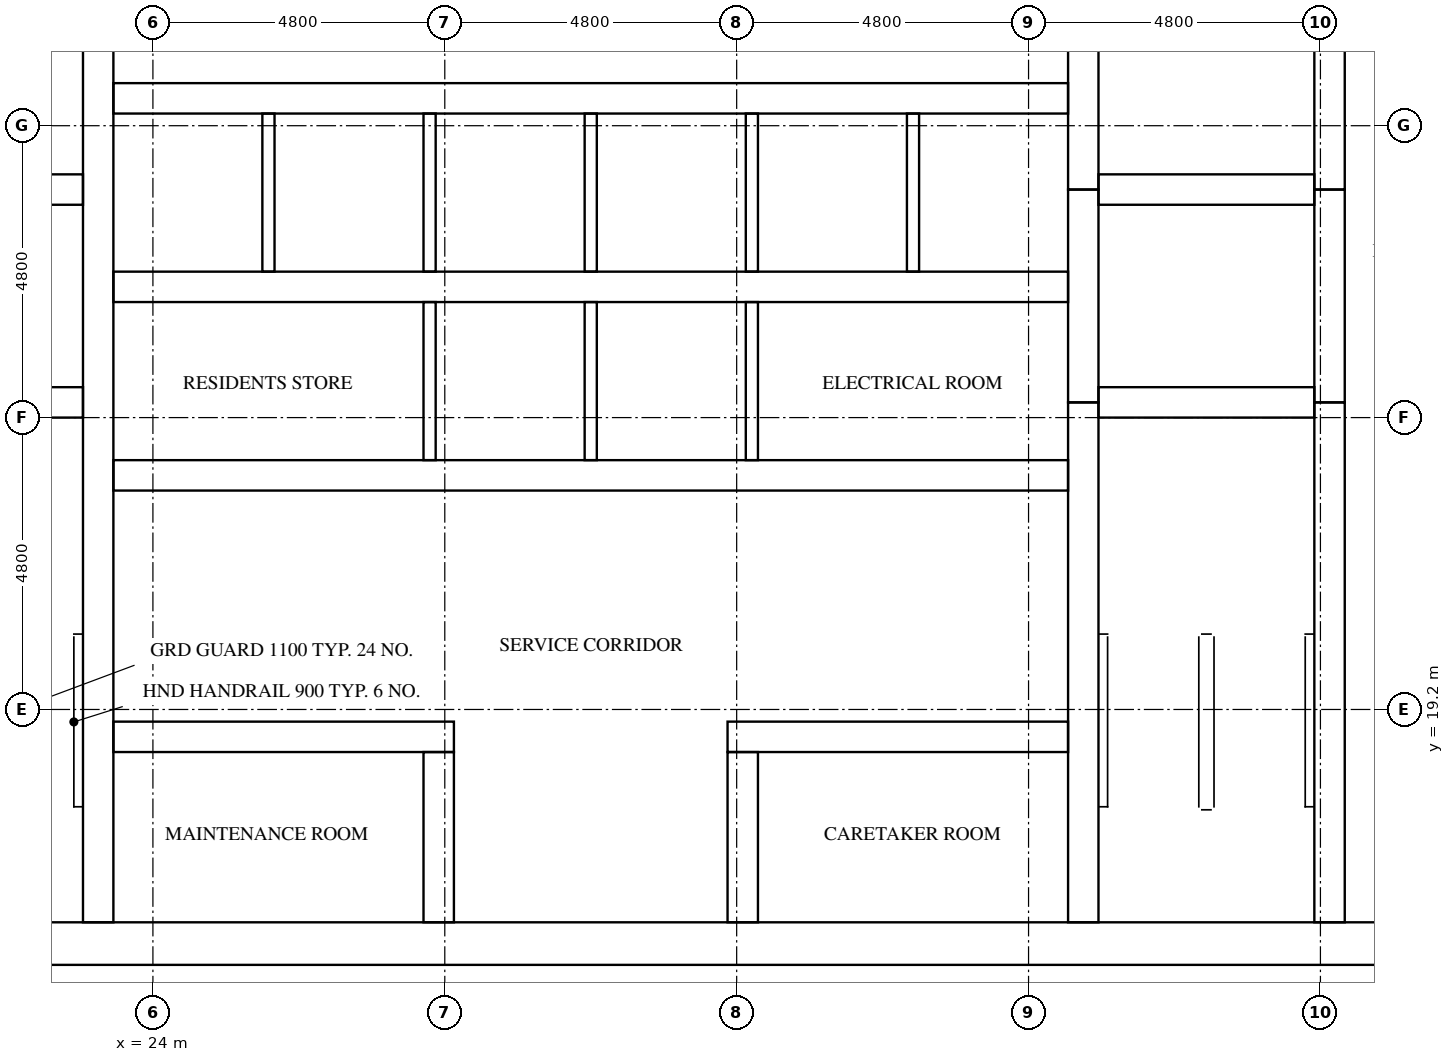
"""IFC4 building model, lengths in metres.
Left out: names, types, materials, properties, quantities, classifications, styles, units other than length and angle.
Written with IfcOpenShell. Run it as: python <this file> out.ifc"""

import sys

from ifc_helpers import new_model, si_unit, direction, frame, frame_2d, origin, place, context, subcontext, project, spatial, rectangle, extrude, element, fill, save


model = new_model("IFC4")
c1 = context("Model", 3, precision=1e-05, world=origin(), true_north=direction((0.0, 1.0)))
c2 = subcontext(c1, "Body", "Model", "MODEL_VIEW")
j1 = project(units=[si_unit("LENGTHUNIT", "METRE"), si_unit("PLANEANGLEUNIT", "RADIAN")], contexts=[c1])
p1 = place(None, origin())
s1 = spatial("IfcSite", under=j1, at=p1, CompositionType="ELEMENT")
p2 = place(p1, origin())
s2 = spatial("IfcBuilding", under=s1, at=p2, CompositionType="ELEMENT")
p3 = place(p2, frame((0.0, 0.0, 196.4)))
s3 = spatial("IfcBuildingStorey", under=s2, at=p3, CompositionType="ELEMENT", Elevation=196.4)
p4 = place(p3, frame((15.0, 15.35, 0.0), z_axis=(0.0, 0.0, 1.0), x_axis=(1.0, 0.0, 0.0)))
e1 = element("IfcWall", 1, at=p4, inside=s3, PredefinedType="SHEAR", context=c2, shape_type="SweptSolid", body=[
    extrude(rectangle(XDim=32.4, YDim=0.7, at=frame_2d((16.2, 0.0))), origin(), (0.0, 0.0, 1.0), 3.2),
])
p5 = place(p4, frame((15.3, 0.0, 0.0)))
e2 = element("IfcOpeningElement", 2, at=p5, cuts=e1, PredefinedType="OPENING", context=c2, shape_type="SweptSolid", body=[
    extrude(rectangle(XDim=1.8, YDim=2.1, at=frame_2d((0.9, 1.05))), frame((0.0, 0.36, 0.0), z_axis=(0.0, -1.0, 0.0), x_axis=(1.0, 0.0, 0.0)), (0.0, 0.0, 1.0), 0.72),
])
p6 = place(p3, frame((23.1, 15.7, 0.0), z_axis=(0.0, 0.0, 1.0), x_axis=(0.0, 1.0, 0.0)))
e3 = element("IfcWall", 3, at=p6, inside=s3, PredefinedType="SHEAR", context=c2, shape_type="SweptSolid", body=[
    extrude(rectangle(XDim=21.4, YDim=0.5, at=frame_2d((10.7, 0.0))), origin(), (0.0, 0.0, 1.0), 3.2),
])
p7 = place(p3, frame((39.3, 15.7, 0.0), z_axis=(0.0, 0.0, 1.0), x_axis=(0.0, 1.0, 0.0)))
e4 = element("IfcWall", 4, at=p7, inside=s3, PredefinedType="SHEAR", context=c2, shape_type="SweptSolid", body=[
    extrude(rectangle(XDim=8.55, YDim=0.5, at=frame_2d((4.275, 0.0))), origin(), (0.0, 0.0, 1.0), 3.2),
])
p8 = place(p3, frame((39.3, 24.25, 0.0), z_axis=(0.0, 0.0, 1.0), x_axis=(0.0, 1.0, 0.0)))
e5 = element("IfcWall", 5, at=p8, inside=s3, PredefinedType="SHEAR", context=c2, shape_type="SweptSolid", body=[
    extrude(rectangle(XDim=3.5, YDim=0.5, at=frame_2d((1.75, 0.0))), origin(), (0.0, 0.0, 1.0), 3.2),
])
p9 = place(p3, frame((39.3, 27.75, 0.0), z_axis=(0.0, 0.0, 1.0), x_axis=(0.0, 1.0, 0.0)))
e6 = element("IfcWall", 6, at=p9, inside=s3, PredefinedType="SHEAR", context=c2, shape_type="SweptSolid", body=[
    extrude(rectangle(XDim=9.35, YDim=0.5, at=frame_2d((4.675, 0.0))), origin(), (0.0, 0.0, 1.0), 3.2),
])
p10 = place(p3, frame((43.35, 15.7, 0.0), z_axis=(0.0, 0.0, 1.0), x_axis=(0.0, 1.0, 0.0)))
e7 = element("IfcWall", 7, at=p10, inside=s3, PredefinedType="SHEAR", context=c2, shape_type="SweptSolid", body=[
    extrude(rectangle(XDim=8.55, YDim=0.5, at=frame_2d((4.275, 0.0))), origin(), (0.0, 0.0, 1.0), 3.2),
])
p11 = place(p10, frame((0.5, 0.0, 0.0)))
e8 = element("IfcOpeningElement", 8, at=p11, cuts=e7, PredefinedType="OPENING", context=c2, shape_type="SweptSolid", body=[
    extrude(rectangle(XDim=1.2, YDim=2.1, at=frame_2d((0.6, 1.05))), frame((0.0, 0.26, 0.0), z_axis=(0.0, -1.0, 0.0), x_axis=(1.0, 0.0, 0.0)), (0.0, 0.0, 1.0), 0.52),
])
p12 = place(p3, frame((43.35, 24.25, 0.0), z_axis=(0.0, 0.0, 1.0), x_axis=(0.0, 1.0, 0.0)))
e9 = element("IfcWall", 9, at=p12, inside=s3, PredefinedType="SHEAR", context=c2, shape_type="SweptSolid", body=[
    extrude(rectangle(XDim=3.5, YDim=0.5, at=frame_2d((1.75, 0.0))), origin(), (0.0, 0.0, 1.0), 3.2),
])
p13 = place(p12, frame((1.2, 0.0, 0.0)))
e10 = element("IfcOpeningElement", 10, at=p13, cuts=e9, PredefinedType="OPENING", context=c2, shape_type="SweptSolid", body=[
    extrude(rectangle(XDim=1.1, YDim=2.1, at=frame_2d((0.55, 1.05))), frame((0.0, 0.26, 0.0), z_axis=(0.0, -1.0, 0.0), x_axis=(1.0, 0.0, 0.0)), (0.0, 0.0, 1.0), 0.52),
])
p14 = place(p3, frame((43.35, 27.75, 0.0), z_axis=(0.0, 0.0, 1.0), x_axis=(0.0, 1.0, 0.0)))
e11 = element("IfcWall", 11, at=p14, inside=s3, PredefinedType="SHEAR", context=c2, shape_type="SweptSolid", body=[
    extrude(rectangle(XDim=9.35, YDim=0.5, at=frame_2d((4.675, 0.0))), origin(), (0.0, 0.0, 1.0), 3.2),
])
p15 = place(p14, frame((7.65, 0.0, 0.0)))
e12 = element("IfcOpeningElement", 12, at=p15, cuts=e11, PredefinedType="OPENING", context=c2, shape_type="SweptSolid", body=[
    extrude(rectangle(XDim=1.2, YDim=2.1, at=frame_2d((0.6, 1.05))), frame((0.0, 0.26, 0.0), z_axis=(0.0, -1.0, 0.0), x_axis=(1.0, 0.0, 0.0)), (0.0, 0.0, 1.0), 0.52),
])
for number, where, z_axis, x_axis in (
    (13, (19.3, 24.25, 0.0), (0.0, 0.0, 1.0), (1.0, 0.0, 0.0)),
    (14, (19.3, 27.75, 0.0), (0.0, 0.0, 1.0), (1.0, 0.0, 0.0)),
    (15, (39.55, 24.25, 0.0), (0.0, 0.0, 1.0), (1.0, 0.0, 0.0)),
    (16, (39.55, 27.75, 0.0), (0.0, 0.0, 1.0), (1.0, 0.0, 0.0)),
):
    element("IfcWall", number, at=place(p3, frame(where, z_axis=z_axis, x_axis=x_axis)), inside=s3, PredefinedType="SHEAR", context=c2, shape_type="SweptSolid", body=[
        extrude(rectangle(XDim=3.55, YDim=0.5, at=frame_2d((1.775, 0.0))), origin(), (0.0, 0.0, 1.0), 3.2),
    ])
p16 = place(p3, frame((23.35, 18.75, 0.0), z_axis=(0.0, 0.0, 1.0), x_axis=(1.0, 0.0, 0.0)))
e17 = element("IfcWall", 17, at=p16, inside=s3, PredefinedType="SHEAR", context=c2, shape_type="SweptSolid", body=[
    extrude(rectangle(XDim=5.6, YDim=0.5, at=frame_2d((2.8, 0.0))), origin(), (0.0, 0.0, 1.0), 3.2),
])
p17 = place(p16, frame((2.05, 0.0, 0.0)))
e18 = element("IfcOpeningElement", 18, at=p17, cuts=e17, PredefinedType="OPENING", context=c2, shape_type="SweptSolid", body=[
    extrude(rectangle(XDim=1.0, YDim=2.1, at=frame_2d((0.5, 1.05))), frame((0.0, 0.26, 0.0), z_axis=(0.0, -1.0, 0.0), x_axis=(1.0, 0.0, 0.0)), (0.0, 0.0, 1.0), 0.52),
])
p18 = place(p3, frame((33.45, 18.75, 0.0), z_axis=(0.0, 0.0, 1.0), x_axis=(1.0, 0.0, 0.0)))
e19 = element("IfcWall", 19, at=p18, inside=s3, PredefinedType="SHEAR", context=c2, shape_type="SweptSolid", body=[
    extrude(rectangle(XDim=5.6, YDim=0.5, at=frame_2d((2.8, 0.0))), origin(), (0.0, 0.0, 1.0), 3.2),
])
p19 = place(p18, frame((2.55, 0.0, 0.0)))
e20 = element("IfcOpeningElement", 20, at=p19, cuts=e19, PredefinedType="OPENING", context=c2, shape_type="SweptSolid", body=[
    extrude(rectangle(XDim=1.0, YDim=2.1, at=frame_2d((0.5, 1.05))), frame((0.0, 0.26, 0.0), z_axis=(0.0, -1.0, 0.0), x_axis=(1.0, 0.0, 0.0)), (0.0, 0.0, 1.0), 0.52),
])
p20 = place(p3, frame((23.35, 23.05, 0.0), z_axis=(0.0, 0.0, 1.0), x_axis=(1.0, 0.0, 0.0)))
e21 = element("IfcWall", 21, at=p20, inside=s3, PredefinedType="SHEAR", context=c2, shape_type="SweptSolid", body=[
    extrude(rectangle(XDim=15.7, YDim=0.5, at=frame_2d((7.85, 0.0))), origin(), (0.0, 0.0, 1.0), 3.2),
])
p21 = place(p20, frame((2.05, 0.0, 0.0)))
e22 = element("IfcOpeningElement", 22, at=p21, cuts=e21, PredefinedType="OPENING", context=c2, shape_type="SweptSolid", body=[
    extrude(rectangle(XDim=1.0, YDim=2.1, at=frame_2d((0.5, 1.05))), frame((0.0, 0.26, 0.0), z_axis=(0.0, -1.0, 0.0), x_axis=(1.0, 0.0, 0.0)), (0.0, 0.0, 1.0), 0.52),
])
p22 = place(p20, frame((12.65, 0.0, 0.0)))
e23 = element("IfcOpeningElement", 23, at=p22, cuts=e21, PredefinedType="OPENING", context=c2, shape_type="SweptSolid", body=[
    extrude(rectangle(XDim=1.0, YDim=2.1, at=frame_2d((0.5, 1.05))), frame((0.0, 0.26, 0.0), z_axis=(0.0, -1.0, 0.0), x_axis=(1.0, 0.0, 0.0)), (0.0, 0.0, 1.0), 0.52),
])
p23 = place(p3, frame((23.35, 26.15, 0.0), z_axis=(0.0, 0.0, 1.0), x_axis=(1.0, 0.0, 0.0)))
e24 = element("IfcWall", 24, at=p23, inside=s3, PredefinedType="SHEAR", context=c2, shape_type="SweptSolid", body=[
    extrude(rectangle(XDim=15.7, YDim=0.5, at=frame_2d((7.85, 0.0))), origin(), (0.0, 0.0, 1.0), 3.2),
])
p24 = place(p3, frame((23.35, 29.25, 0.0), z_axis=(0.0, 0.0, 1.0), x_axis=(1.0, 0.0, 0.0)))
e25 = element("IfcWall", 25, at=p24, inside=s3, PredefinedType="SHEAR", context=c2, shape_type="SweptSolid", body=[
    extrude(rectangle(XDim=15.7, YDim=0.5, at=frame_2d((7.85, 0.0))), origin(), (0.0, 0.0, 1.0), 3.2),
])
p25 = place(p24, frame((0.675, 0.0, 0.0)))
e26 = element("IfcOpeningElement", 26, at=p25, cuts=e25, PredefinedType="OPENING", context=c2, shape_type="SweptSolid", body=[
    extrude(rectangle(XDim=1.1, YDim=2.1, at=frame_2d((0.55, 1.05))), frame((0.0, 0.26, 0.0), z_axis=(0.0, -1.0, 0.0), x_axis=(1.0, 0.0, 0.0)), (0.0, 0.0, 1.0), 0.52),
])
p26 = place(p24, frame((3.325, 0.0, 0.0)))
e27 = element("IfcOpeningElement", 27, at=p26, cuts=e25, PredefinedType="OPENING", context=c2, shape_type="SweptSolid", body=[
    extrude(rectangle(XDim=1.1, YDim=2.1, at=frame_2d((0.55, 1.05))), frame((0.0, 0.26, 0.0), z_axis=(0.0, -1.0, 0.0), x_axis=(1.0, 0.0, 0.0)), (0.0, 0.0, 1.0), 0.52),
])
p27 = place(p24, frame((5.975, 0.0, 0.0)))
e28 = element("IfcOpeningElement", 28, at=p27, cuts=e25, PredefinedType="OPENING", context=c2, shape_type="SweptSolid", body=[
    extrude(rectangle(XDim=1.1, YDim=2.1, at=frame_2d((0.55, 1.05))), frame((0.0, 0.26, 0.0), z_axis=(0.0, -1.0, 0.0), x_axis=(1.0, 0.0, 0.0)), (0.0, 0.0, 1.0), 0.52),
])
p28 = place(p24, frame((8.625, 0.0, 0.0)))
e29 = element("IfcOpeningElement", 29, at=p28, cuts=e25, PredefinedType="OPENING", context=c2, shape_type="SweptSolid", body=[
    extrude(rectangle(XDim=1.1, YDim=2.1, at=frame_2d((0.55, 1.05))), frame((0.0, 0.26, 0.0), z_axis=(0.0, -1.0, 0.0), x_axis=(1.0, 0.0, 0.0)), (0.0, 0.0, 1.0), 0.52),
])
p29 = place(p24, frame((11.275, 0.0, 0.0)))
e30 = element("IfcOpeningElement", 30, at=p29, cuts=e25, PredefinedType="OPENING", context=c2, shape_type="SweptSolid", body=[
    extrude(rectangle(XDim=1.1, YDim=2.1, at=frame_2d((0.55, 1.05))), frame((0.0, 0.26, 0.0), z_axis=(0.0, -1.0, 0.0), x_axis=(1.0, 0.0, 0.0)), (0.0, 0.0, 1.0), 0.52),
])
p30 = place(p24, frame((13.925, 0.0, 0.0)))
e31 = element("IfcOpeningElement", 31, at=p30, cuts=e25, PredefinedType="OPENING", context=c2, shape_type="SweptSolid", body=[
    extrude(rectangle(XDim=1.1, YDim=2.1, at=frame_2d((0.55, 1.05))), frame((0.0, 0.26, 0.0), z_axis=(0.0, -1.0, 0.0), x_axis=(1.0, 0.0, 0.0)), (0.0, 0.0, 1.0), 0.52),
])
for number, where, z_axis, x_axis in (
    (32, (28.7, 15.7, 0.0), (0.0, 0.0, 1.0), (0.0, 1.0, 0.0)),
    (33, (33.7, 15.7, 0.0), (0.0, 0.0, 1.0), (0.0, 1.0, 0.0)),
):
    element("IfcWall", number, at=place(p3, frame(where, z_axis=z_axis, x_axis=x_axis)), inside=s3, PredefinedType="SHEAR", context=c2, shape_type="SweptSolid", body=[
        extrude(rectangle(XDim=2.8, YDim=0.5, at=frame_2d((1.4, 0.0))), origin(), (0.0, 0.0, 1.0), 3.2),
    ])
p31 = place(p3, frame((25.9, 26.4, 0.0), z_axis=(0.0, 0.0, 1.0), x_axis=(0.0, 1.0, 0.0)))
e34 = element("IfcWall", 34, at=p31, inside=s3, PredefinedType="SOLIDWALL", context=c2, shape_type="SweptSolid", body=[
    extrude(rectangle(XDim=2.6, YDim=0.2, at=frame_2d((1.3, 0.0))), origin(), (0.0, 0.0, 1.0), 3.2),
])
p32 = place(p3, frame((28.55, 23.3, 0.0), z_axis=(0.0, 0.0, 1.0), x_axis=(0.0, 1.0, 0.0)))
e35 = element("IfcWall", 35, at=p32, inside=s3, PredefinedType="SOLIDWALL", context=c2, shape_type="SweptSolid", body=[
    extrude(rectangle(XDim=2.6, YDim=0.2, at=frame_2d((1.3, 0.0))), origin(), (0.0, 0.0, 1.0), 3.2),
])
p33 = place(p3, frame((28.55, 26.4, 0.0), z_axis=(0.0, 0.0, 1.0), x_axis=(0.0, 1.0, 0.0)))
e36 = element("IfcWall", 36, at=p33, inside=s3, PredefinedType="SOLIDWALL", context=c2, shape_type="SweptSolid", body=[
    extrude(rectangle(XDim=2.6, YDim=0.2, at=frame_2d((1.3, 0.0))), origin(), (0.0, 0.0, 1.0), 3.2),
])
p34 = place(p3, frame((31.2, 23.3, 0.0), z_axis=(0.0, 0.0, 1.0), x_axis=(0.0, 1.0, 0.0)))
e37 = element("IfcWall", 37, at=p34, inside=s3, PredefinedType="SOLIDWALL", context=c2, shape_type="SweptSolid", body=[
    extrude(rectangle(XDim=2.6, YDim=0.2, at=frame_2d((1.3, 0.0))), origin(), (0.0, 0.0, 1.0), 3.2),
])
p35 = place(p3, frame((31.2, 26.4, 0.0), z_axis=(0.0, 0.0, 1.0), x_axis=(0.0, 1.0, 0.0)))
e38 = element("IfcWall", 38, at=p35, inside=s3, PredefinedType="SOLIDWALL", context=c2, shape_type="SweptSolid", body=[
    extrude(rectangle(XDim=2.6, YDim=0.2, at=frame_2d((1.3, 0.0))), origin(), (0.0, 0.0, 1.0), 3.2),
])
p36 = place(p3, frame((33.85, 23.3, 0.0), z_axis=(0.0, 0.0, 1.0), x_axis=(0.0, 1.0, 0.0)))
e39 = element("IfcWall", 39, at=p36, inside=s3, PredefinedType="SOLIDWALL", context=c2, shape_type="SweptSolid", body=[
    extrude(rectangle(XDim=2.6, YDim=0.2, at=frame_2d((1.3, 0.0))), origin(), (0.0, 0.0, 1.0), 3.2),
])
for number, where, z_axis, x_axis in (
    (40, (33.85, 26.4, 0.0), (0.0, 0.0, 1.0), (0.0, 1.0, 0.0)),
    (41, (36.5, 26.4, 0.0), (0.0, 0.0, 1.0), (0.0, 1.0, 0.0)),
):
    element("IfcWall", number, at=place(p3, frame(where, z_axis=z_axis, x_axis=x_axis)), inside=s3, PredefinedType="SOLIDWALL", context=c2, shape_type="SweptSolid", body=[
        extrude(rectangle(XDim=2.6, YDim=0.2, at=frame_2d((1.3, 0.0))), origin(), (0.0, 0.0, 1.0), 3.2),
    ])
p37 = place(p25, origin())
e42 = element("IfcDoor", 42, at=p37, inside=s3, OperationType="DOUBLE_DOOR_SLIDING", PredefinedType="DOOR", context=c2, shape_type="SweptSolid", body=[
    extrude(rectangle(XDim=1.1, YDim=2.1, at=frame_2d((0.55, 1.05))), frame((0.0, 0.025, 0.0), z_axis=(0.0, -1.0, 0.0), x_axis=(1.0, 0.0, 0.0)), (0.0, 0.0, 1.0), 0.05),
])
fill(e26, e42)
p38 = place(p26, origin())
e43 = element("IfcDoor", 43, at=p38, inside=s3, OperationType="DOUBLE_DOOR_SLIDING", PredefinedType="DOOR", context=c2, shape_type="SweptSolid", body=[
    extrude(rectangle(XDim=1.1, YDim=2.1, at=frame_2d((0.55, 1.05))), frame((0.0, 0.025, 0.0), z_axis=(0.0, -1.0, 0.0), x_axis=(1.0, 0.0, 0.0)), (0.0, 0.0, 1.0), 0.05),
])
fill(e27, e43)
p39 = place(p27, origin())
e44 = element("IfcDoor", 44, at=p39, inside=s3, OperationType="DOUBLE_DOOR_SLIDING", PredefinedType="DOOR", context=c2, shape_type="SweptSolid", body=[
    extrude(rectangle(XDim=1.1, YDim=2.1, at=frame_2d((0.55, 1.05))), frame((0.0, 0.025, 0.0), z_axis=(0.0, -1.0, 0.0), x_axis=(1.0, 0.0, 0.0)), (0.0, 0.0, 1.0), 0.05),
])
fill(e28, e44)
p40 = place(p28, origin())
e45 = element("IfcDoor", 45, at=p40, inside=s3, OperationType="DOUBLE_DOOR_SLIDING", PredefinedType="DOOR", context=c2, shape_type="SweptSolid", body=[
    extrude(rectangle(XDim=1.1, YDim=2.1, at=frame_2d((0.55, 1.05))), frame((0.0, 0.025, 0.0), z_axis=(0.0, -1.0, 0.0), x_axis=(1.0, 0.0, 0.0)), (0.0, 0.0, 1.0), 0.05),
])
fill(e29, e45)
p41 = place(p29, origin())
e46 = element("IfcDoor", 46, at=p41, inside=s3, OperationType="DOUBLE_DOOR_SLIDING", PredefinedType="DOOR", context=c2, shape_type="SweptSolid", body=[
    extrude(rectangle(XDim=1.1, YDim=2.1, at=frame_2d((0.55, 1.05))), frame((0.0, 0.025, 0.0), z_axis=(0.0, -1.0, 0.0), x_axis=(1.0, 0.0, 0.0)), (0.0, 0.0, 1.0), 0.05),
])
fill(e30, e46)
p42 = place(p30, origin())
e47 = element("IfcDoor", 47, at=p42, inside=s3, OperationType="DOUBLE_DOOR_SLIDING", PredefinedType="DOOR", context=c2, shape_type="SweptSolid", body=[
    extrude(rectangle(XDim=1.1, YDim=2.1, at=frame_2d((0.55, 1.05))), frame((0.0, 0.025, 0.0), z_axis=(0.0, -1.0, 0.0), x_axis=(1.0, 0.0, 0.0)), (0.0, 0.0, 1.0), 0.05),
])
fill(e31, e47)
p43 = place(p13, origin())
e48 = element("IfcDoor", 48, at=p43, inside=s3, OperationType="DOUBLE_DOOR_SLIDING", PredefinedType="DOOR", context=c2, shape_type="SweptSolid", body=[
    extrude(rectangle(XDim=1.1, YDim=2.1, at=frame_2d((0.55, 1.05))), frame((0.0, 0.025, 0.0), z_axis=(0.0, -1.0, 0.0), x_axis=(1.0, 0.0, 0.0)), (0.0, 0.0, 1.0), 0.05),
])
fill(e10, e48)
p44 = place(p11, origin())
e49 = element("IfcDoor", 49, at=p44, inside=s3, OperationType="SINGLE_SWING_RIGHT", PredefinedType="DOOR", context=c2, shape_type="SweptSolid", body=[
    extrude(rectangle(XDim=1.2, YDim=2.1, at=frame_2d((0.6, 1.05))), frame((0.0, 0.025, 0.0), z_axis=(0.0, -1.0, 0.0), x_axis=(1.0, 0.0, 0.0)), (0.0, 0.0, 1.0), 0.05),
])
fill(e8, e49)
p45 = place(p5, frame((1.8, 0.0, 0.0), z_axis=(0.0, 0.0, 1.0), x_axis=(-1.0, 0.0, 0.0)))
e50 = element("IfcDoor", 50, at=p45, inside=s3, OperationType="DOUBLE_DOOR_SINGLE_SWING", PredefinedType="DOOR", context=c2, shape_type="SweptSolid", body=[
    extrude(rectangle(XDim=1.8, YDim=2.1, at=frame_2d((0.9, 1.05))), frame((0.0, 0.025, 0.0), z_axis=(0.0, -1.0, 0.0), x_axis=(1.0, 0.0, 0.0)), (0.0, 0.0, 1.0), 0.05),
])
fill(e2, e50)
p46 = place(p21, frame((1.0, 0.0, 0.0), z_axis=(0.0, 0.0, 1.0), x_axis=(-1.0, 0.0, 0.0)))
e51 = element("IfcDoor", 51, at=p46, inside=s3, OperationType="SINGLE_SWING_RIGHT", PredefinedType="DOOR", context=c2, shape_type="SweptSolid", body=[
    extrude(rectangle(XDim=1.0, YDim=2.1, at=frame_2d((0.5, 1.05))), frame((0.0, 0.025, 0.0), z_axis=(0.0, -1.0, 0.0), x_axis=(1.0, 0.0, 0.0)), (0.0, 0.0, 1.0), 0.05),
])
fill(e22, e51)
p47 = place(p22, frame((1.0, 0.0, 0.0), z_axis=(0.0, 0.0, 1.0), x_axis=(-1.0, 0.0, 0.0)))
e52 = element("IfcDoor", 52, at=p47, inside=s3, OperationType="SINGLE_SWING_LEFT", PredefinedType="DOOR", context=c2, shape_type="SweptSolid", body=[
    extrude(rectangle(XDim=1.0, YDim=2.1, at=frame_2d((0.5, 1.05))), frame((0.0, 0.025, 0.0), z_axis=(0.0, -1.0, 0.0), x_axis=(1.0, 0.0, 0.0)), (0.0, 0.0, 1.0), 0.05),
])
fill(e23, e52)
p48 = place(p17, origin())
e53 = element("IfcDoor", 53, at=p48, inside=s3, OperationType="SINGLE_SWING_RIGHT", PredefinedType="DOOR", context=c2, shape_type="SweptSolid", body=[
    extrude(rectangle(XDim=1.0, YDim=2.1, at=frame_2d((0.5, 1.05))), frame((0.0, 0.025, 0.0), z_axis=(0.0, -1.0, 0.0), x_axis=(1.0, 0.0, 0.0)), (0.0, 0.0, 1.0), 0.05),
])
fill(e18, e53)
p49 = place(p19, origin())
e54 = element("IfcDoor", 54, at=p49, inside=s3, OperationType="SINGLE_SWING_LEFT", PredefinedType="DOOR", context=c2, shape_type="SweptSolid", body=[
    extrude(rectangle(XDim=1.0, YDim=2.1, at=frame_2d((0.5, 1.05))), frame((0.0, 0.025, 0.0), z_axis=(0.0, -1.0, 0.0), x_axis=(1.0, 0.0, 0.0)), (0.0, 0.0, 1.0), 0.05),
])
fill(e20, e54)
save(model, sys.argv[1])
